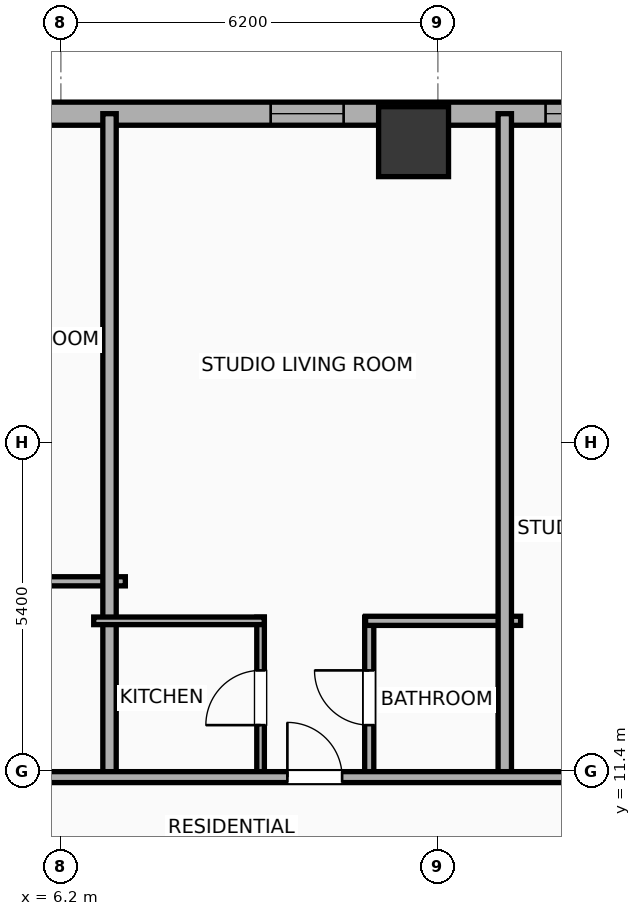
"""IFC4 building model, lengths in metres.
Left out: names, types, materials, properties, quantities, classifications, styles, units other than length and angle.
Written with IfcOpenShell. Run it as: python <this file> out.ifc"""

import sys

from ifc_helpers import new_model, si_unit, direction, frame, frame_2d, origin, origin_2d, place, context, subcontext, project, spatial, rectangle, hollow_rectangle, extrude, element, fill, save


model = new_model("IFC4")
c1 = context("Model", 3, precision=1e-05, world=origin(), true_north=direction((0.0, 1.0)))
c2 = subcontext(c1, "Body", "Model", "MODEL_VIEW")
j1 = project(units=[si_unit("LENGTHUNIT", "METRE"), si_unit("PLANEANGLEUNIT", "RADIAN")], contexts=[c1])
p1 = place(None, origin())
s1 = spatial("IfcSite", under=j1, at=p1, CompositionType="ELEMENT")
p2 = place(p1, origin())
s2 = spatial("IfcBuilding", under=s1, at=p2, CompositionType="ELEMENT")
p3 = place(p2, frame((0.0, 0.0, 49.4)))
s3 = spatial("IfcBuildingStorey", under=s2, at=p3, CompositionType="ELEMENT", Elevation=49.4)
p4 = place(p3, frame((12.0, 21.75, 0.0), z_axis=(0.0, 0.0, 1.0), x_axis=(1.0, 0.0, 0.0)))
e1 = element("IfcColumn", 1, at=p4, inside=s3, PredefinedType="COLUMN", context=c2, shape_type="SweptSolid", body=[
    extrude(hollow_rectangle(XDim=1.15, YDim=1.15, WallThickness=0.04, at=origin_2d()), origin(), (0.0, 0.0, 1.0), 3.9),
])
p5 = place(p3, frame((-29.581, 22.21, 0.0), z_axis=(0.0, 0.0, 1.0), x_axis=(1.0, 0.0, 0.0)))
e2 = element("IfcWall", 2, at=p5, inside=s3, PredefinedType="ELEMENTEDWALL", context=c2, shape_type="SweptSolid", body=[
    extrude(rectangle(XDim=51.963, YDim=0.38, at=frame_2d((25.981, 0.0))), origin(), (0.0, 0.0, 1.0), 3.65),
])
p6 = place(p5, frame((6.61, 0.0, 0.75)))
e3 = element("IfcOpeningElement", 3, at=p6, cuts=e2, PredefinedType="OPENING", context=c2, shape_type="SweptSolid", body=[
    extrude(rectangle(XDim=2.4, YDim=2.1, at=frame_2d((1.2, 1.05))), frame((0.0, 0.2, 0.0), z_axis=(0.0, -1.0, 0.0), x_axis=(1.0, 0.0, 0.0)), (0.0, 0.0, 1.0), 0.4),
])
p7 = place(p5, frame((26.431, 0.0, 0.75)))
e4 = element("IfcOpeningElement", 4, at=p7, cuts=e2, PredefinedType="OPENING", context=c2, shape_type="SweptSolid", body=[
    extrude(rectangle(XDim=2.4, YDim=2.1, at=frame_2d((1.2, 1.05))), frame((0.0, 0.2, 0.0), z_axis=(0.0, -1.0, 0.0), x_axis=(1.0, 0.0, 0.0)), (0.0, 0.0, 1.0), 0.4),
])
p8 = place(p5, frame((43.752, 0.0, 0.75)))
e5 = element("IfcOpeningElement", 5, at=p8, cuts=e2, PredefinedType="OPENING", context=c2, shape_type="SweptSolid", body=[
    extrude(rectangle(XDim=2.4, YDim=2.1, at=frame_2d((1.2, 1.05))), frame((0.0, 0.2, 0.0), z_axis=(0.0, -1.0, 0.0), x_axis=(1.0, 0.0, 0.0)), (0.0, 0.0, 1.0), 0.4),
])
p9 = place(p5, frame((1.281, 0.0, 0.75)))
e6 = element("IfcOpeningElement", 6, at=p9, cuts=e2, PredefinedType="OPENING", context=c2, shape_type="SweptSolid", body=[
    extrude(rectangle(XDim=1.2, YDim=2.05, at=frame_2d((0.6, 1.025))), frame((0.0, 0.2, 0.0), z_axis=(0.0, -1.0, 0.0), x_axis=(1.0, 0.0, 0.0)), (0.0, 0.0, 1.0), 0.4),
])
p10 = place(p5, frame((3.922, 0.0, 0.75)))
e7 = element("IfcOpeningElement", 7, at=p10, cuts=e2, PredefinedType="OPENING", context=c2, shape_type="SweptSolid", body=[
    extrude(rectangle(XDim=1.2, YDim=2.05, at=frame_2d((0.6, 1.025))), frame((0.0, 0.2, 0.0), z_axis=(0.0, -1.0, 0.0), x_axis=(1.0, 0.0, 0.0)), (0.0, 0.0, 1.0), 0.4),
])
p11 = place(p5, frame((12.231, 0.0, 0.75)))
e8 = element("IfcOpeningElement", 8, at=p11, cuts=e2, PredefinedType="OPENING", context=c2, shape_type="SweptSolid", body=[
    extrude(rectangle(XDim=1.2, YDim=2.05, at=frame_2d((0.6, 1.025))), frame((0.0, 0.2, 0.0), z_axis=(0.0, -1.0, 0.0), x_axis=(1.0, 0.0, 0.0)), (0.0, 0.0, 1.0), 0.4),
])
p12 = place(p5, frame((18.805, 0.0, 0.75)))
e9 = element("IfcOpeningElement", 9, at=p12, cuts=e2, PredefinedType="OPENING", context=c2, shape_type="SweptSolid", body=[
    extrude(rectangle(XDim=1.2, YDim=2.05, at=frame_2d((0.6, 1.025))), frame((0.0, 0.2, 0.0), z_axis=(0.0, -1.0, 0.0), x_axis=(1.0, 0.0, 0.0)), (0.0, 0.0, 1.0), 0.4),
])
p13 = place(p5, frame((16.755, 0.0, 0.75)))
e10 = element("IfcOpeningElement", 10, at=p13, cuts=e2, PredefinedType="OPENING", context=c2, shape_type="SweptSolid", body=[
    extrude(rectangle(XDim=1.2, YDim=2.05, at=frame_2d((0.6, 1.025))), frame((0.0, 0.2, 0.0), z_axis=(0.0, -1.0, 0.0), x_axis=(1.0, 0.0, 0.0)), (0.0, 0.0, 1.0), 0.4),
])
p14 = place(p5, frame((23.776, 0.0, 0.75)))
e11 = element("IfcOpeningElement", 11, at=p14, cuts=e2, PredefinedType="OPENING", context=c2, shape_type="SweptSolid", body=[
    extrude(rectangle(XDim=1.2, YDim=2.05, at=frame_2d((0.6, 1.025))), frame((0.0, 0.2, 0.0), z_axis=(0.0, -1.0, 0.0), x_axis=(1.0, 0.0, 0.0)), (0.0, 0.0, 1.0), 0.4),
])
p15 = place(p5, frame((32.031, 0.0, 0.75)))
e12 = element("IfcOpeningElement", 12, at=p15, cuts=e2, PredefinedType="OPENING", context=c2, shape_type="SweptSolid", body=[
    extrude(rectangle(XDim=0.85, YDim=2.05, at=frame_2d((0.425, 1.025))), frame((0.0, 0.2, 0.0), z_axis=(0.0, -1.0, 0.0), x_axis=(1.0, 0.0, 0.0)), (0.0, 0.0, 1.0), 0.4),
])
p16 = place(p5, frame((34.276, 0.0, 0.75)))
e13 = element("IfcOpeningElement", 13, at=p16, cuts=e2, PredefinedType="OPENING", context=c2, shape_type="SweptSolid", body=[
    extrude(rectangle(XDim=1.2, YDim=2.05, at=frame_2d((0.6, 1.025))), frame((0.0, 0.2, 0.0), z_axis=(0.0, -1.0, 0.0), x_axis=(1.0, 0.0, 0.0)), (0.0, 0.0, 1.0), 0.4),
])
p17 = place(p5, frame((39.231, 0.0, 0.75)))
e14 = element("IfcOpeningElement", 14, at=p17, cuts=e2, PredefinedType="OPENING", context=c2, shape_type="SweptSolid", body=[
    extrude(rectangle(XDim=1.2, YDim=2.05, at=frame_2d((0.6, 1.025))), frame((0.0, 0.2, 0.0), z_axis=(0.0, -1.0, 0.0), x_axis=(1.0, 0.0, 0.0)), (0.0, 0.0, 1.0), 0.4),
])
p18 = place(p5, frame((47.676, 0.0, 0.75)))
e15 = element("IfcOpeningElement", 15, at=p18, cuts=e2, PredefinedType="OPENING", context=c2, shape_type="SweptSolid", body=[
    extrude(rectangle(XDim=1.2, YDim=2.05, at=frame_2d((0.6, 1.025))), frame((0.0, 0.2, 0.0), z_axis=(0.0, -1.0, 0.0), x_axis=(1.0, 0.0, 0.0)), (0.0, 0.0, 1.0), 0.4),
])
p19 = place(p5, frame((49.847, 0.0, 0.75)))
e16 = element("IfcOpeningElement", 16, at=p19, cuts=e2, PredefinedType="OPENING", context=c2, shape_type="SweptSolid", body=[
    extrude(rectangle(XDim=1.2, YDim=2.05, at=frame_2d((0.6, 1.025))), frame((0.0, 0.2, 0.0), z_axis=(0.0, -1.0, 0.0), x_axis=(1.0, 0.0, 0.0)), (0.0, 0.0, 1.0), 0.4),
])
p20 = place(p3, frame((3.47, 14.52, 0.0), z_axis=(0.0, 0.0, 1.0), x_axis=(1.0, 0.0, 0.0)))
e17 = element("IfcWall", 17, at=p20, inside=s3, PredefinedType="PLUMBINGWALL", context=c2, shape_type="SweptSolid", body=[
    extrude(rectangle(XDim=3.79, YDim=0.15, at=frame_2d((1.895, 0.0))), origin(), (0.0, 0.0, 1.0), 3.65),
])
p21 = place(p3, frame((7.0, 11.22, 0.0), z_axis=(0.0, 0.0, 1.0), x_axis=(0.0, 1.0, 0.0)))
e18 = element("IfcWall", 18, at=p21, inside=s3, PredefinedType="PARTITIONING", context=c2, shape_type="SweptSolid", body=[
    extrude(rectangle(XDim=10.99, YDim=0.22, at=frame_2d((5.495, 0.0))), origin(), (0.0, 0.0, 1.0), 3.65),
])
p22 = place(p3, frame((9.484, 11.28, 0.0), z_axis=(0.0, 0.0, 1.0), x_axis=(0.0, 1.0, 0.0)))
e19 = element("IfcWall", 19, at=p22, inside=s3, PredefinedType="PARTITIONING", context=c2, shape_type="SweptSolid", body=[
    extrude(rectangle(XDim=2.65, YDim=0.125, at=frame_2d((1.325, 0.0))), origin(), (0.0, 0.0, 1.0), 3.65),
])
p23 = place(p22, frame((0.875, 0.0, 0.0)))
e20 = element("IfcOpeningElement", 20, at=p23, cuts=e19, PredefinedType="OPENING", context=c2, shape_type="SweptSolid", body=[
    extrude(rectangle(XDim=0.9, YDim=2.05, at=frame_2d((0.45, 1.025))), frame((0.0, 0.073, 0.0), z_axis=(0.0, -1.0, 0.0), x_axis=(1.0, 0.0, 0.0)), (0.0, 0.0, 1.0), 0.145),
])
p24 = place(p3, frame((11.271, 11.28, 0.0), z_axis=(0.0, 0.0, 1.0), x_axis=(0.0, 1.0, 0.0)))
e21 = element("IfcWall", 21, at=p24, inside=s3, PredefinedType="PLUMBINGWALL", context=c2, shape_type="SweptSolid", body=[
    extrude(rectangle(XDim=2.65, YDim=0.15, at=frame_2d((1.325, 0.0))), origin(), (0.0, 0.0, 1.0), 3.65),
])
p25 = place(p24, frame((0.875, 0.0, 0.0)))
e22 = element("IfcOpeningElement", 22, at=p25, cuts=e21, PredefinedType="OPENING", context=c2, shape_type="SweptSolid", body=[
    extrude(rectangle(XDim=0.9, YDim=2.05, at=frame_2d((0.45, 1.025))), frame((0.0, 0.085, 0.0), z_axis=(0.0, -1.0, 0.0), x_axis=(1.0, 0.0, 0.0)), (0.0, 0.0, 1.0), 0.17),
])
p26 = place(p3, frame((6.74, 13.87, 0.0), z_axis=(0.0, 0.0, 1.0), x_axis=(1.0, 0.0, 0.0)))
e23 = element("IfcWall", 23, at=p26, inside=s3, PredefinedType="PARTITIONING", context=c2, shape_type="SweptSolid", body=[
    extrude(rectangle(XDim=2.804, YDim=0.125, at=frame_2d((1.402, 0.0))), origin(), (0.0, 0.0, 1.0), 3.65),
])
p27 = place(p3, frame((11.211, 13.87, 0.0), z_axis=(0.0, 0.0, 1.0), x_axis=(1.0, 0.0, 0.0)))
e24 = element("IfcWall", 24, at=p27, inside=s3, PredefinedType="PLUMBINGWALL", context=c2, shape_type="SweptSolid", body=[
    extrude(rectangle(XDim=2.549, YDim=0.15, at=frame_2d((1.274, 0.0))), origin(), (0.0, 0.0, 1.0), 3.65),
])
p28 = place(p3, frame((13.5, 11.22, 0.0), z_axis=(0.0, 0.0, 1.0), x_axis=(0.0, 1.0, 0.0)))
e25 = element("IfcWall", 25, at=p28, inside=s3, PredefinedType="PARTITIONING", context=c2, shape_type="SweptSolid", body=[
    extrude(rectangle(XDim=10.99, YDim=0.22, at=frame_2d((5.495, 0.0))), origin(), (0.0, 0.0, 1.0), 3.65),
])
p29 = place(p3, frame((-33.41, 11.3, 0.0), z_axis=(0.0, 0.0, 1.0), x_axis=(1.0, 0.0, 0.0)))
e26 = element("IfcWall", 26, at=p29, inside=s3, PredefinedType="PARTITIONING", context=c2, shape_type="SweptSolid", body=[
    extrude(rectangle(XDim=59.62, YDim=0.18, at=frame_2d((29.81, 0.0))), origin(), (0.0, 0.0, 1.0), 3.65),
])
p30 = place(p29, frame((3.032, 0.0, 0.0)))
e27 = element("IfcOpeningElement", 27, at=p30, cuts=e26, PredefinedType="OPENING", context=c2, shape_type="SweptSolid", body=[
    extrude(rectangle(XDim=0.9, YDim=2.05, at=frame_2d((0.45, 1.025))), frame((0.0, 0.1, 0.0), z_axis=(0.0, -1.0, 0.0), x_axis=(1.0, 0.0, 0.0)), (0.0, 0.0, 1.0), 0.2),
])
p31 = place(p29, frame((9.769, 0.0, 0.0)))
e28 = element("IfcOpeningElement", 28, at=p31, cuts=e26, PredefinedType="OPENING", context=c2, shape_type="SweptSolid", body=[
    extrude(rectangle(XDim=0.9, YDim=2.05, at=frame_2d((0.45, 1.025))), frame((0.0, 0.1, 0.0), z_axis=(0.0, -1.0, 0.0), x_axis=(1.0, 0.0, 0.0)), (0.0, 0.0, 1.0), 0.2),
])
p32 = place(p29, frame((16.339, 0.0, 0.0)))
e29 = element("IfcOpeningElement", 29, at=p32, cuts=e26, PredefinedType="OPENING", context=c2, shape_type="SweptSolid", body=[
    extrude(rectangle(XDim=0.9, YDim=2.05, at=frame_2d((0.45, 1.025))), frame((0.0, 0.1, 0.0), z_axis=(0.0, -1.0, 0.0), x_axis=(1.0, 0.0, 0.0)), (0.0, 0.0, 1.0), 0.2),
])
p33 = place(p29, frame((23.827, 0.0, 0.0)))
e30 = element("IfcOpeningElement", 30, at=p33, cuts=e26, PredefinedType="OPENING", context=c2, shape_type="SweptSolid", body=[
    extrude(rectangle(XDim=1.15, YDim=2.05, at=frame_2d((0.575, 1.025))), frame((0.0, 0.1, 0.0), z_axis=(0.0, -1.0, 0.0), x_axis=(1.0, 0.0, 0.0)), (0.0, 0.0, 1.0), 0.2),
])
p34 = place(p29, frame((29.622, 0.0, 0.0)))
e31 = element("IfcOpeningElement", 31, at=p34, cuts=e26, PredefinedType="OPENING", context=c2, shape_type="SweptSolid", body=[
    extrude(rectangle(XDim=0.9, YDim=2.05, at=frame_2d((0.45, 1.025))), frame((0.0, 0.1, 0.0), z_axis=(0.0, -1.0, 0.0), x_axis=(1.0, 0.0, 0.0)), (0.0, 0.0, 1.0), 0.2),
])
p35 = place(p29, frame((36.628, 0.0, 0.0)))
e32 = element("IfcOpeningElement", 32, at=p35, cuts=e26, PredefinedType="OPENING", context=c2, shape_type="SweptSolid", body=[
    extrude(rectangle(XDim=0.9, YDim=2.05, at=frame_2d((0.45, 1.025))), frame((0.0, 0.1, 0.0), z_axis=(0.0, -1.0, 0.0), x_axis=(1.0, 0.0, 0.0)), (0.0, 0.0, 1.0), 0.2),
])
p36 = place(p29, frame((43.335, 0.0, 0.0)))
e33 = element("IfcOpeningElement", 33, at=p36, cuts=e26, PredefinedType="OPENING", context=c2, shape_type="SweptSolid", body=[
    extrude(rectangle(XDim=0.9, YDim=2.05, at=frame_2d((0.45, 1.025))), frame((0.0, 0.1, 0.0), z_axis=(0.0, -1.0, 0.0), x_axis=(1.0, 0.0, 0.0)), (0.0, 0.0, 1.0), 0.2),
])
p37 = place(p29, frame((48.307, 0.0, 0.0)))
e34 = element("IfcOpeningElement", 34, at=p37, cuts=e26, PredefinedType="OPENING", context=c2, shape_type="SweptSolid", body=[
    extrude(rectangle(XDim=1.15, YDim=2.05, at=frame_2d((0.575, 1.025))), frame((0.0, 0.1, 0.0), z_axis=(0.0, -1.0, 0.0), x_axis=(1.0, 0.0, 0.0)), (0.0, 0.0, 1.0), 0.2),
])
p38 = place(p29, frame((56.225, 0.0, 0.0)))
e35 = element("IfcOpeningElement", 35, at=p38, cuts=e26, PredefinedType="OPENING", context=c2, shape_type="SweptSolid", body=[
    extrude(rectangle(XDim=0.9, YDim=2.05, at=frame_2d((0.45, 1.025))), frame((0.0, 0.1, 0.0), z_axis=(0.0, -1.0, 0.0), x_axis=(1.0, 0.0, 0.0)), (0.0, 0.0, 1.0), 0.2),
])
p39 = place(p8, origin())
e36 = element("IfcWindow", 36, at=p39, inside=s3, PartitioningType="SINGLE_PANEL", PredefinedType="WINDOW", context=c2, shape_type="SweptSolid", body=[
    extrude(rectangle(XDim=2.4, YDim=2.1, at=frame_2d((1.2, 1.05))), frame((0.0, 0.03, 0.0), z_axis=(0.0, -1.0, 0.0), x_axis=(1.0, 0.0, 0.0)), (0.0, 0.0, 1.0), 0.06),
])
fill(e5, e36)
p40 = place(p17, origin())
e37 = element("IfcWindow", 37, at=p40, inside=s3, PartitioningType="SINGLE_PANEL", PredefinedType="WINDOW", context=c2, shape_type="SweptSolid", body=[
    extrude(rectangle(XDim=1.2, YDim=2.05, at=frame_2d((0.6, 1.025))), frame((0.0, 0.03, 0.0), z_axis=(0.0, -1.0, 0.0), x_axis=(1.0, 0.0, 0.0)), (0.0, 0.0, 1.0), 0.06),
])
fill(e14, e37)
p41 = place(p23, origin())
e38 = element("IfcDoor", 38, at=p41, inside=s3, OperationType="SINGLE_SWING_LEFT", PredefinedType="DOOR", context=c2, shape_type="SweptSolid", body=[
    extrude(rectangle(XDim=0.9, YDim=2.05, at=frame_2d((0.45, 1.025))), frame((0.0, 0.025, 0.0), z_axis=(0.0, -1.0, 0.0), x_axis=(1.0, 0.0, 0.0)), (0.0, 0.0, 1.0), 0.05),
])
fill(e20, e38)
p42 = place(p25, origin())
e39 = element("IfcDoor", 39, at=p42, inside=s3, OperationType="SINGLE_SWING_RIGHT", PredefinedType="DOOR", context=c2, shape_type="SweptSolid", body=[
    extrude(rectangle(XDim=0.9, YDim=2.05, at=frame_2d((0.45, 1.025))), frame((0.0, 0.025, 0.0), z_axis=(0.0, -1.0, 0.0), x_axis=(1.0, 0.0, 0.0)), (0.0, 0.0, 1.0), 0.05),
])
fill(e22, e39)
p43 = place(p36, origin())
e40 = element("IfcDoor", 40, at=p43, inside=s3, OperationType="SINGLE_SWING_LEFT", PredefinedType="DOOR", context=c2, shape_type="SweptSolid", body=[
    extrude(rectangle(XDim=0.9, YDim=2.05, at=frame_2d((0.45, 1.025))), frame((0.0, 0.025, 0.0), z_axis=(0.0, -1.0, 0.0), x_axis=(1.0, 0.0, 0.0)), (0.0, 0.0, 1.0), 0.05),
])
fill(e33, e40)
save(model, sys.argv[1])
